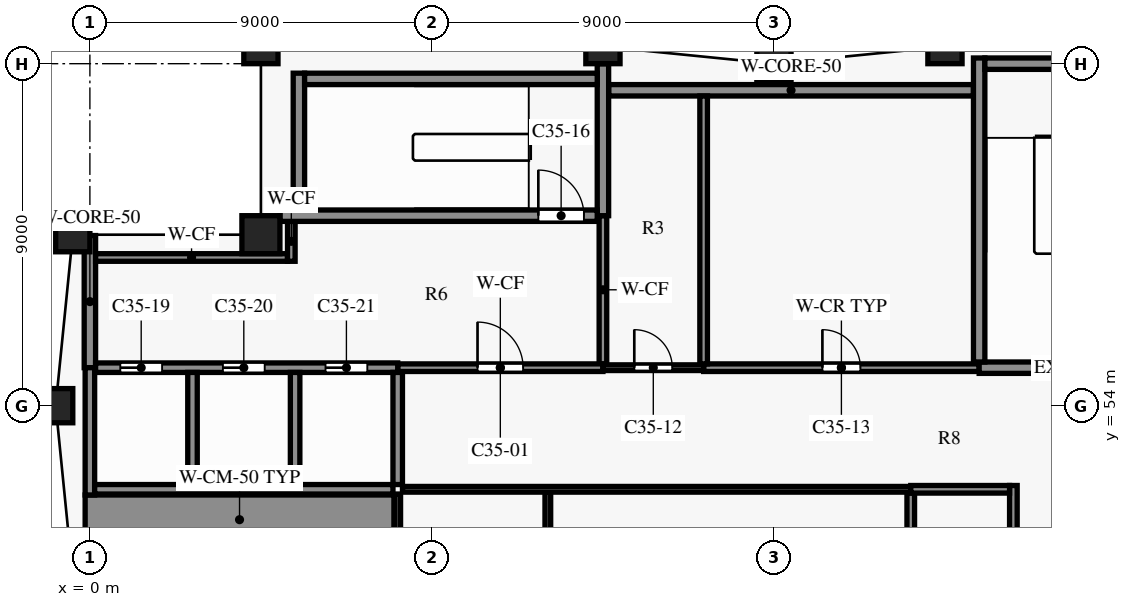
"""IFC4 building model, lengths in metres.
Left out: names, types, materials, properties, quantities, classifications, styles, units other than length and angle.
Written with IfcOpenShell. Run it as: python <this file> out.ifc"""

import sys

from ifc_helpers import new_model, si_unit, direction, frame, frame_2d, origin, origin_2d, place, context, subcontext, project, spatial, rectangle, extrude, element, fill, save


model = new_model("IFC4")
c1 = context("Model", 3, precision=1e-05, world=origin(), true_north=direction((0.0, 1.0)))
c2 = subcontext(c1, "Body", "Model", "MODEL_VIEW")
j1 = project(units=[si_unit("LENGTHUNIT", "METRE"), si_unit("PLANEANGLEUNIT", "RADIAN")], contexts=[c1])
p1 = place(None, origin())
s1 = spatial("IfcSite", under=j1, at=p1, CompositionType="ELEMENT")
p2 = place(p1, origin())
s2 = spatial("IfcBuilding", under=s1, at=p2, CompositionType="ELEMENT")
p3 = place(p2, frame((0.0, 0.0, 256.2)))
s3 = spatial("IfcBuildingStorey", under=s2, at=p3, CompositionType="ELEMENT", Elevation=256.2)
for number, where, z_axis, x_axis in (
    (1, (22.5, 63.45, 0.0), (0.0, 0.0, 1.0), (-0.995, -0.1, 0.0)),
    (2, (18.0, 63.0, 0.0), (0.0, 0.0, 1.0), (-1.0, 0.0, 0.0)),
    (3, (13.5, 63.45, 0.0), (0.0, 0.0, 1.0), (-0.995, 0.1, 0.0)),
    (4, (4.5, 63.45, 0.0), (0.0, 0.0, 1.0), (-0.995, -0.1, 0.0)),
    (5, (-0.45, 58.5, 0.0), (0.0, 0.0, 1.0), (-0.1, -0.995, 0.0)),
    (6, (-0.9, 54.0, 0.0), (0.0, 0.0, 1.0), (0.0, -1.0, 0.0)),
):
    element("IfcColumn", number, at=place(p3, frame(where, z_axis=z_axis, x_axis=x_axis)), inside=s3, PredefinedType="COLUMN", context=c2, shape_type="SweptSolid", body=[
        extrude(rectangle(XDim=0.9, YDim=0.9, at=origin_2d()), origin(), (0.0, 0.0, 1.0), 3.8),
    ])
p4 = place(p3, frame((4.5, 58.5, 0.0), z_axis=(0.0, 0.0, 1.0), x_axis=(1.0, 0.0, 0.0)))
e7 = element("IfcColumn", 7, at=p4, inside=s3, PredefinedType="COLUMN", context=c2, shape_type="SweptSolid", body=[
    extrude(rectangle(XDim=1.0, YDim=1.0, at=origin_2d()), origin(), (0.0, 0.0, 1.0), 3.8),
])
p5 = place(p3, frame((-0.125, 51.0, 0.0), z_axis=(0.0, 0.0, 1.0), x_axis=(1.0, 0.0, 0.0)))
e8 = element("IfcWall", 8, at=p5, inside=s3, PredefinedType="SHEAR", context=c2, shape_type="SweptSolid", body=[
    extrude(rectangle(XDim=8.125, YDim=1.3, at=frame_2d((4.062, 0.0))), origin(), (0.0, 0.0, 1.0), 3.5),
])
p6 = place(p3, frame((8.225, 51.8, 0.0), z_axis=(0.0, 0.0, 1.0), x_axis=(1.0, 0.0, 0.0)))
e9 = element("IfcWall", 9, at=p6, inside=s3, PredefinedType="PARTITIONING", context=c2, shape_type="SweptSolid", body=[
    extrude(rectangle(XDim=13.375, YDim=0.15, at=frame_2d((6.688, 0.0))), origin(), (0.0, 0.0, 1.0), 3.5),
])
p7 = place(p3, frame((21.6, 51.8, 0.0), z_axis=(0.0, 0.0, 1.0), x_axis=(1.0, 0.0, 0.0)))
e10 = element("IfcWall", 10, at=p7, inside=s3, PredefinedType="PARTITIONING", context=c2, shape_type="SweptSolid", body=[
    extrude(rectangle(XDim=2.6, YDim=0.2, at=frame_2d((1.3, 0.0))), origin(), (0.0, 0.0, 1.0), 3.5),
])
p8 = place(p3, frame((0.125, 51.8, 0.0), z_axis=(0.0, 0.0, 1.0), x_axis=(1.0, 0.0, 0.0)))
e11 = element("IfcWall", 11, at=p8, inside=s3, PredefinedType="SHEAR", context=c2, shape_type="SweptSolid", body=[
    extrude(rectangle(XDim=7.85, YDim=0.25, at=frame_2d((3.925, 0.0))), origin(), (0.0, 0.0, 1.0), 3.5),
])
p9 = place(p3, frame((8.1, 55.0, 0.0), z_axis=(0.0, 0.0, 1.0), x_axis=(1.0, 0.0, 0.0)))
e12 = element("IfcWall", 12, at=p9, inside=s3, PredefinedType="PARTITIONING", context=c2, shape_type="SweptSolid", body=[
    extrude(rectangle(XDim=5.4, YDim=0.2, at=frame_2d((2.7, 0.0))), origin(), (0.0, 0.0, 1.0), 3.5),
])
p10 = place(p9, frame((2.1, 0.0, 0.0)))
e13 = element("IfcOpeningElement", 13, at=p10, cuts=e12, PredefinedType="OPENING", context=c2, shape_type="SweptSolid", body=[
    extrude(rectangle(XDim=1.2, YDim=2.2, at=frame_2d((0.6, 1.1))), frame((0.0, 0.11, 0.0), z_axis=(0.0, -1.0, 0.0), x_axis=(1.0, 0.0, 0.0)), (0.0, 0.0, 1.0), 0.22),
])
p11 = place(p3, frame((13.5, 55.0, 0.0), z_axis=(0.0, 0.0, 1.0), x_axis=(1.0, 0.0, 0.0)))
e14 = element("IfcWall", 14, at=p11, inside=s3, PredefinedType="PARTITIONING", context=c2, shape_type="SweptSolid", body=[
    extrude(rectangle(XDim=2.65, YDim=0.15, at=frame_2d((1.325, 0.0))), origin(), (0.0, 0.0, 1.0), 3.5),
])
p12 = place(p11, frame((0.825, 0.0, 0.0)))
e15 = element("IfcOpeningElement", 15, at=p12, cuts=e14, PredefinedType="OPENING", context=c2, shape_type="SweptSolid", body=[
    extrude(rectangle(XDim=1.0, YDim=2.1, at=frame_2d((0.5, 1.05))), frame((0.0, 0.085, 0.0), z_axis=(0.0, -1.0, 0.0), x_axis=(1.0, 0.0, 0.0)), (0.0, 0.0, 1.0), 0.17),
])
p13 = place(p3, frame((16.15, 55.0, 0.0), z_axis=(0.0, 0.0, 1.0), x_axis=(1.0, 0.0, 0.0)))
e16 = element("IfcWall", 16, at=p13, inside=s3, PredefinedType="PARTITIONING", context=c2, shape_type="SweptSolid", body=[
    extrude(rectangle(XDim=7.25, YDim=0.2, at=frame_2d((3.625, 0.0))), origin(), (0.0, 0.0, 1.0), 3.5),
])
p14 = place(p13, frame((3.125, 0.0, 0.0)))
e17 = element("IfcOpeningElement", 17, at=p14, cuts=e16, PredefinedType="OPENING", context=c2, shape_type="SweptSolid", body=[
    extrude(rectangle(XDim=1.0, YDim=2.1, at=frame_2d((0.5, 1.05))), frame((0.0, 0.11, 0.0), z_axis=(0.0, -1.0, 0.0), x_axis=(1.0, 0.0, 0.0)), (0.0, 0.0, 1.0), 0.22),
])
p15 = place(p3, frame((0.15, 55.0, 0.0), z_axis=(0.0, 0.0, 1.0), x_axis=(1.0, 0.0, 0.0)))
e18 = element("IfcWall", 18, at=p15, inside=s3, PredefinedType="SHEAR", context=c2, shape_type="SweptSolid", body=[
    extrude(rectangle(XDim=7.95, YDim=0.25, at=frame_2d((3.975, 0.0))), origin(), (0.0, 0.0, 1.0), 3.5),
])
p16 = place(p15, frame((0.65, 0.0, 0.0)))
e19 = element("IfcOpeningElement", 19, at=p16, cuts=e18, PredefinedType="OPENING", context=c2, shape_type="SweptSolid", body=[
    extrude(rectangle(XDim=1.1, YDim=2.1, at=frame_2d((0.55, 1.05))), frame((0.0, 0.135, 0.0), z_axis=(0.0, -1.0, 0.0), x_axis=(1.0, 0.0, 0.0)), (0.0, 0.0, 1.0), 0.27),
])
p17 = place(p15, frame((3.35, 0.0, 0.0)))
e20 = element("IfcOpeningElement", 20, at=p17, cuts=e18, PredefinedType="OPENING", context=c2, shape_type="SweptSolid", body=[
    extrude(rectangle(XDim=1.1, YDim=2.1, at=frame_2d((0.55, 1.05))), frame((0.0, 0.135, 0.0), z_axis=(0.0, -1.0, 0.0), x_axis=(1.0, 0.0, 0.0)), (0.0, 0.0, 1.0), 0.27),
])
p18 = place(p15, frame((6.05, 0.0, 0.0)))
e21 = element("IfcOpeningElement", 21, at=p18, cuts=e18, PredefinedType="OPENING", context=c2, shape_type="SweptSolid", body=[
    extrude(rectangle(XDim=1.1, YDim=2.1, at=frame_2d((0.55, 1.05))), frame((0.0, 0.135, 0.0), z_axis=(0.0, -1.0, 0.0), x_axis=(1.0, 0.0, 0.0)), (0.0, 0.0, 1.0), 0.27),
])
p19 = place(p3, frame((23.4, 55.0, 0.0), z_axis=(0.0, 0.0, 1.0), x_axis=(1.0, 0.0, 0.0)))
e22 = element("IfcWall", 22, at=p19, inside=s3, PredefinedType="SHEAR", context=c2, shape_type="SweptSolid", body=[
    extrude(rectangle(XDim=3.45, YDim=0.3, at=frame_2d((1.725, 0.0))), origin(), (0.0, 0.0, 1.0), 3.5),
])
p20 = place(p3, frame((0.15, 57.9, 0.0), z_axis=(0.0, 0.0, 1.0), x_axis=(1.0, 0.0, 0.0)))
e23 = element("IfcWall", 23, at=p20, inside=s3, PredefinedType="PARTITIONING", context=c2, shape_type="SweptSolid", body=[
    extrude(rectangle(XDim=5.05, YDim=0.2, at=frame_2d((2.525, 0.0))), origin(), (0.0, 0.0, 1.0), 3.5),
])
p21 = place(p3, frame((5.0, 59.0, 0.0), z_axis=(0.0, 0.0, 1.0), x_axis=(1.0, 0.0, 0.0)))
e24 = element("IfcWall", 24, at=p21, inside=s3, PredefinedType="SHEAR", context=c2, shape_type="SweptSolid", body=[
    extrude(rectangle(XDim=8.35, YDim=0.3, at=frame_2d((4.175, 0.0))), origin(), (0.0, 0.0, 1.0), 3.5),
])
p22 = place(p21, frame((6.8, 0.0, 0.0)))
e25 = element("IfcOpeningElement", 25, at=p22, cuts=e24, PredefinedType="OPENING", context=c2, shape_type="SweptSolid", body=[
    extrude(rectangle(XDim=1.2, YDim=2.2, at=frame_2d((0.6, 1.1))), frame((0.0, 0.16, 0.0), z_axis=(0.0, -1.0, 0.0), x_axis=(1.0, 0.0, 0.0)), (0.0, 0.0, 1.0), 0.32),
])
p23 = place(p3, frame((13.65, 62.3, 0.0), z_axis=(0.0, 0.0, 1.0), x_axis=(1.0, 0.0, 0.0)))
e26 = element("IfcWall", 26, at=p23, inside=s3, PredefinedType="SHEAR", context=c2, shape_type="SweptSolid", body=[
    extrude(rectangle(XDim=9.6, YDim=0.3, at=frame_2d((4.8, 0.0))), origin(), (0.0, 0.0, 1.0), 3.5),
])
p24 = place(p3, frame((5.65, 62.6, 0.0), z_axis=(0.0, 0.0, 1.0), x_axis=(1.0, 0.0, 0.0)))
e27 = element("IfcWall", 27, at=p24, inside=s3, PredefinedType="SHEAR", context=c2, shape_type="SweptSolid", body=[
    extrude(rectangle(XDim=7.7, YDim=0.3, at=frame_2d((3.85, 0.0))), origin(), (0.0, 0.0, 1.0), 3.5),
])
p25 = place(p3, frame((23.55, 63.0, 0.0), z_axis=(0.0, 0.0, 1.0), x_axis=(1.0, 0.0, 0.0)))
e28 = element("IfcWall", 28, at=p25, inside=s3, PredefinedType="SHEAR", context=c2, shape_type="SweptSolid", body=[
    extrude(rectangle(XDim=3.3, YDim=0.3, at=frame_2d((1.65, 0.0))), origin(), (0.0, 0.0, 1.0), 3.5),
])
p26 = place(p3, frame((0.0, 55.0, 0.0), z_axis=(0.0, 0.0, 1.0), x_axis=(0.0, 1.0, 0.0)))
e29 = element("IfcWall", 29, at=p26, inside=s3, PredefinedType="SHEAR", context=c2, shape_type="SweptSolid", body=[
    extrude(rectangle(XDim=3.478, YDim=0.3, at=frame_2d((1.739, 0.0))), origin(), (0.0, 0.0, 1.0), 3.5),
])
p27 = place(p3, frame((0.0, 51.65, 0.0), z_axis=(0.0, 0.0, 1.0), x_axis=(0.0, 1.0, 0.0)))
e30 = element("IfcWall", 30, at=p27, inside=s3, PredefinedType="SHEAR", context=c2, shape_type="SweptSolid", body=[
    extrude(rectangle(XDim=3.35, YDim=0.25, at=frame_2d((1.675, 0.0))), origin(), (0.0, 0.0, 1.0), 3.5),
])
p28 = place(p3, frame((2.7, 51.925, 0.0), z_axis=(0.0, 0.0, 1.0), x_axis=(0.0, 1.0, 0.0)))
e31 = element("IfcWall", 31, at=p28, inside=s3, PredefinedType="SHEAR", context=c2, shape_type="SweptSolid", body=[
    extrude(rectangle(XDim=2.95, YDim=0.25, at=frame_2d((1.475, 0.0))), origin(), (0.0, 0.0, 1.0), 3.5),
])
p29 = place(p3, frame((5.3, 57.8, 0.0), z_axis=(0.0, 0.0, 1.0), x_axis=(0.0, 1.0, 0.0)))
e32 = element("IfcWall", 32, at=p29, inside=s3, PredefinedType="PARTITIONING", context=c2, shape_type="SweptSolid", body=[
    extrude(rectangle(XDim=1.05, YDim=0.2, at=frame_2d((0.525, 0.0))), origin(), (0.0, 0.0, 1.0), 3.5),
])
p30 = place(p3, frame((5.4, 51.925, 0.0), z_axis=(0.0, 0.0, 1.0), x_axis=(0.0, 1.0, 0.0)))
e33 = element("IfcWall", 33, at=p30, inside=s3, PredefinedType="SHEAR", context=c2, shape_type="SweptSolid", body=[
    extrude(rectangle(XDim=2.95, YDim=0.25, at=frame_2d((1.475, 0.0))), origin(), (0.0, 0.0, 1.0), 3.5),
])
p31 = place(p3, frame((5.5, 59.15, 0.0), z_axis=(0.0, 0.0, 1.0), x_axis=(0.0, 1.0, 0.0)))
e34 = element("IfcWall", 34, at=p31, inside=s3, PredefinedType="SHEAR", context=c2, shape_type="SweptSolid", body=[
    extrude(rectangle(XDim=3.6, YDim=0.3, at=frame_2d((1.8, 0.0))), origin(), (0.0, 0.0, 1.0), 3.5),
])
p32 = place(p3, frame((8.1, 50.2, 0.0), z_axis=(0.0, 0.0, 1.0), x_axis=(0.0, 1.0, 0.0)))
e35 = element("IfcWall", 35, at=p32, inside=s3, PredefinedType="PARTITIONING", context=c2, shape_type="SweptSolid", body=[
    extrude(rectangle(XDim=1.475, YDim=0.15, at=frame_2d((0.738, 0.0))), origin(), (0.0, 0.0, 1.0), 3.5),
])
p33 = place(p3, frame((8.1, 51.925, 0.0), z_axis=(0.0, 0.0, 1.0), x_axis=(0.0, 1.0, 0.0)))
e36 = element("IfcWall", 36, at=p33, inside=s3, PredefinedType="SHEAR", context=c2, shape_type="SweptSolid", body=[
    extrude(rectangle(XDim=2.95, YDim=0.25, at=frame_2d((1.475, 0.0))), origin(), (0.0, 0.0, 1.0), 3.5),
])
p34 = place(p3, frame((12.05, 47.075, 0.0), z_axis=(0.0, 0.0, 1.0), x_axis=(0.0, 1.0, 0.0)))
e37 = element("IfcWall", 37, at=p34, inside=s3, PredefinedType="PARTITIONING", context=c2, shape_type="SweptSolid", body=[
    extrude(rectangle(XDim=4.65, YDim=0.15, at=frame_2d((2.325, 0.0))), origin(), (0.0, 0.0, 1.0), 3.5),
])
p35 = place(p3, frame((13.5, 55.1, 0.0), z_axis=(0.0, 0.0, 1.0), x_axis=(0.0, 1.0, 0.0)))
e38 = element("IfcWall", 38, at=p35, inside=s3, PredefinedType="PARTITIONING", context=c2, shape_type="SweptSolid", body=[
    extrude(rectangle(XDim=3.9, YDim=0.2, at=frame_2d((1.95, 0.0))), origin(), (0.0, 0.0, 1.0), 3.5),
])
p36 = place(p3, frame((13.5, 59.0, 0.0), z_axis=(0.0, 0.0, 1.0), x_axis=(0.0, 1.0, 0.0)))
e39 = element("IfcWall", 39, at=p36, inside=s3, PredefinedType="SHEAR", context=c2, shape_type="SweptSolid", body=[
    extrude(rectangle(XDim=3.998, YDim=0.3, at=frame_2d((1.999, 0.0))), origin(), (0.0, 0.0, 1.0), 3.5),
])
p37 = place(p3, frame((16.15, 55.1, 0.0), z_axis=(0.0, 0.0, 1.0), x_axis=(0.0, 1.0, 0.0)))
e40 = element("IfcWall", 40, at=p37, inside=s3, PredefinedType="PARTITIONING", context=c2, shape_type="SweptSolid", body=[
    extrude(rectangle(XDim=7.05, YDim=0.2, at=frame_2d((3.525, 0.0))), origin(), (0.0, 0.0, 1.0), 3.5),
])
p38 = place(p3, frame((21.6, 47.1, 0.0), z_axis=(0.0, 0.0, 1.0), x_axis=(0.0, 1.0, 0.0)))
e41 = element("IfcWall", 41, at=p38, inside=s3, PredefinedType="PARTITIONING", context=c2, shape_type="SweptSolid", body=[
    extrude(rectangle(XDim=4.6, YDim=0.2, at=frame_2d((2.3, 0.0))), origin(), (0.0, 0.0, 1.0), 3.5),
])
p39 = place(p3, frame((23.4, 55.15, 0.0), z_axis=(0.0, 0.0, 1.0), x_axis=(0.0, 1.0, 0.0)))
e42 = element("IfcWall", 42, at=p39, inside=s3, PredefinedType="SHEAR", context=c2, shape_type="SweptSolid", body=[
    extrude(rectangle(XDim=8.0, YDim=0.3, at=frame_2d((4.0, 0.0))), origin(), (0.0, 0.0, 1.0), 3.5),
])
p40 = place(p3, frame((24.3, 46.9, 0.0), z_axis=(0.0, 0.0, 1.0), x_axis=(0.0, 1.0, 0.0)))
e43 = element("IfcWall", 43, at=p40, inside=s3, PredefinedType="SHEAR", context=c2, shape_type="SweptSolid", body=[
    extrude(rectangle(XDim=5.0, YDim=0.2, at=frame_2d((2.5, 0.0))), origin(), (0.0, 0.0, 1.0), 3.5),
])
p41 = place(p10, origin())
e44 = element("IfcDoor", 44, at=p41, inside=s3, OperationType="SINGLE_SWING_RIGHT", PredefinedType="DOOR", context=c2, shape_type="SweptSolid", body=[
    extrude(rectangle(XDim=1.2, YDim=2.2, at=frame_2d((0.6, 1.1))), frame((0.0, 0.025, 0.0), z_axis=(0.0, -1.0, 0.0), x_axis=(1.0, 0.0, 0.0)), (0.0, 0.0, 1.0), 0.05),
])
fill(e13, e44)
p42 = place(p12, origin())
e45 = element("IfcDoor", 45, at=p42, inside=s3, OperationType="SINGLE_SWING_LEFT", PredefinedType="DOOR", context=c2, shape_type="SweptSolid", body=[
    extrude(rectangle(XDim=1.0, YDim=2.1, at=frame_2d((0.5, 1.05))), frame((0.0, 0.025, 0.0), z_axis=(0.0, -1.0, 0.0), x_axis=(1.0, 0.0, 0.0)), (0.0, 0.0, 1.0), 0.05),
])
fill(e15, e45)
p43 = place(p14, origin())
e46 = element("IfcDoor", 46, at=p43, inside=s3, OperationType="SINGLE_SWING_RIGHT", PredefinedType="DOOR", context=c2, shape_type="SweptSolid", body=[
    extrude(rectangle(XDim=1.0, YDim=2.1, at=frame_2d((0.5, 1.05))), frame((0.0, 0.025, 0.0), z_axis=(0.0, -1.0, 0.0), x_axis=(1.0, 0.0, 0.0)), (0.0, 0.0, 1.0), 0.05),
])
fill(e17, e46)
p44 = place(p22, origin())
e47 = element("IfcDoor", 47, at=p44, inside=s3, OperationType="SINGLE_SWING_RIGHT", PredefinedType="DOOR", context=c2, shape_type="SweptSolid", body=[
    extrude(rectangle(XDim=1.2, YDim=2.2, at=frame_2d((0.6, 1.1))), frame((0.0, 0.025, 0.0), z_axis=(0.0, -1.0, 0.0), x_axis=(1.0, 0.0, 0.0)), (0.0, 0.0, 1.0), 0.05),
])
fill(e25, e47)
p45 = place(p16, origin())
e48 = element("IfcDoor", 48, at=p45, inside=s3, OperationType="DOUBLE_DOOR_SLIDING", PredefinedType="DOOR", context=c2, shape_type="SweptSolid", body=[
    extrude(rectangle(XDim=1.1, YDim=2.1, at=frame_2d((0.55, 1.05))), frame((0.0, 0.025, 0.0), z_axis=(0.0, -1.0, 0.0), x_axis=(1.0, 0.0, 0.0)), (0.0, 0.0, 1.0), 0.05),
])
fill(e19, e48)
p46 = place(p17, origin())
e49 = element("IfcDoor", 49, at=p46, inside=s3, OperationType="DOUBLE_DOOR_SLIDING", PredefinedType="DOOR", context=c2, shape_type="SweptSolid", body=[
    extrude(rectangle(XDim=1.1, YDim=2.1, at=frame_2d((0.55, 1.05))), frame((0.0, 0.025, 0.0), z_axis=(0.0, -1.0, 0.0), x_axis=(1.0, 0.0, 0.0)), (0.0, 0.0, 1.0), 0.05),
])
fill(e20, e49)
p47 = place(p18, origin())
e50 = element("IfcDoor", 50, at=p47, inside=s3, OperationType="DOUBLE_DOOR_SLIDING", PredefinedType="DOOR", context=c2, shape_type="SweptSolid", body=[
    extrude(rectangle(XDim=1.1, YDim=2.1, at=frame_2d((0.55, 1.05))), frame((0.0, 0.025, 0.0), z_axis=(0.0, -1.0, 0.0), x_axis=(1.0, 0.0, 0.0)), (0.0, 0.0, 1.0), 0.05),
])
fill(e21, e50)
save(model, sys.argv[1])
